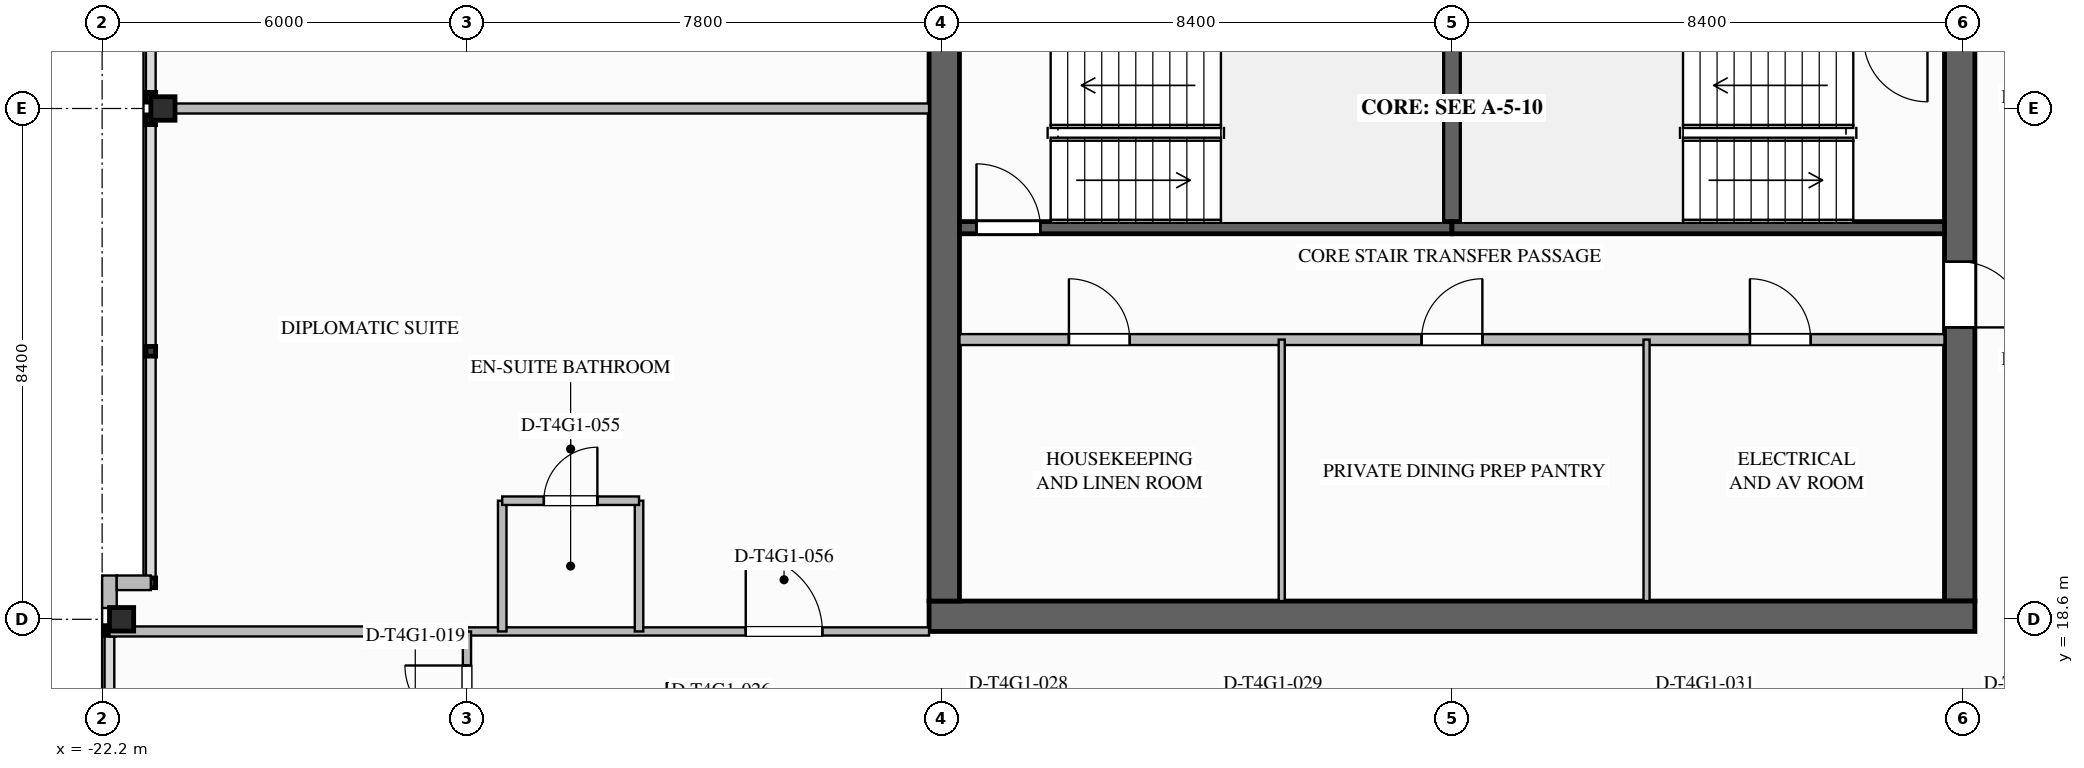
"""IFC4 building model, lengths in metres.
Left out: names, types, materials, properties, quantities, classifications, styles, units other than length and angle.
Written with IfcOpenShell. Run it as: python <this file> out.ifc"""

import sys

from ifc_helpers import new_model, si_unit, direction, frame, frame_2d, origin, origin_2d, place, context, subcontext, project, spatial, rectangle, i_section, extrude, element, fill, save


model = new_model("IFC4")
c1 = context("Model", 3, precision=1e-05, world=origin(), true_north=direction((0.0, 1.0)))
c2 = subcontext(c1, "Body", "Model", "MODEL_VIEW")
j1 = project(units=[si_unit("LENGTHUNIT", "METRE"), si_unit("PLANEANGLEUNIT", "RADIAN")], contexts=[c1])
p1 = place(None, origin())
s1 = spatial("IfcSite", under=j1, at=p1, CompositionType="ELEMENT")
p2 = place(p1, origin())
s2 = spatial("IfcBuilding", under=s1, at=p2, CompositionType="ELEMENT")
p3 = place(p2, frame((0.0, 0.0, 208.7)))
s3 = spatial("IfcBuildingStorey", under=s2, at=p3, CompositionType="ELEMENT", Elevation=208.7)
p4 = place(p3, frame((8.35, 35.1, 0.0), z_axis=(0.0, 0.0, 1.0), x_axis=(0.0, -1.0, 0.0)))
e1 = element("IfcWall", 1, at=p4, inside=s3, PredefinedType="SHEAR", context=c2, shape_type="SweptSolid", body=[
    extrude(rectangle(XDim=16.2, YDim=0.5, at=frame_2d((8.1, 0.0))), origin(), (0.0, 0.0, 1.0), 3.6),
])
p5 = place(p4, frame((3.08, 0.0, 0.0)))
e2 = element("IfcOpeningElement", 2, at=p5, cuts=e1, PredefinedType="OPENING", context=c2, shape_type="SweptSolid", body=[
    extrude(rectangle(XDim=1.12, YDim=2.1, at=frame_2d((0.56, 1.05))), frame((0.0, 0.26, 0.0), z_axis=(0.0, -1.0, 0.0), x_axis=(1.0, 0.0, 0.0)), (0.0, 0.0, 1.0), 0.52),
])
p6 = place(p4, frame((10.62, 0.0, 0.0)))
e3 = element("IfcOpeningElement", 3, at=p6, cuts=e1, PredefinedType="OPENING", context=c2, shape_type="SweptSolid", body=[
    extrude(rectangle(XDim=1.08, YDim=2.04, at=frame_2d((0.54, 1.02))), frame((0.0, 0.26, 0.0), z_axis=(0.0, -1.0, 0.0), x_axis=(1.0, 0.0, 0.0)), (0.0, 0.0, 1.0), 0.52),
])
p7 = place(p3, frame((8.6, 18.65, 0.0), z_axis=(0.0, 0.0, 1.0), x_axis=(-1.0, 0.0, 0.0)))
e4 = element("IfcWall", 4, at=p7, inside=s3, PredefinedType="SHEAR", context=c2, shape_type="SweptSolid", body=[
    extrude(rectangle(XDim=17.2, YDim=0.5, at=frame_2d((8.6, 0.0))), origin(), (0.0, 0.0, 1.0), 3.6),
])
p8 = place(p3, frame((-8.35, 18.9, 0.0), z_axis=(0.0, 0.0, 1.0), x_axis=(0.0, 1.0, 0.0)))
e5 = element("IfcWall", 5, at=p8, inside=s3, PredefinedType="SHEAR", context=c2, shape_type="SweptSolid", body=[
    extrude(rectangle(XDim=16.2, YDim=0.5, at=frame_2d((8.1, 0.0))), origin(), (0.0, 0.0, 1.0), 3.6),
])
for number, where, z_axis, x_axis in (
    (6, (-21.88, 18.6, 0.0), (0.0, 0.0, 1.0), (1.0, 0.0, 0.0)),
    (7, (-21.2, 27.0, 0.0), (0.0, 0.0, 1.0), (1.0, 0.0, 0.0)),
):
    element("IfcColumn", number, at=place(p3, frame(where, z_axis=z_axis, x_axis=x_axis)), inside=s3, PredefinedType="COLUMN", context=c2, shape_type="SweptSolid", body=[
        extrude(i_section(OverallWidth=0.397, OverallDepth=0.387, WebThickness=0.021, FlangeThickness=0.033, FilletRadius=0.025, at=origin_2d()), origin(), (0.0, 0.0, 1.0), 3.597),
    ])
p9 = place(p3, frame((-22.08, 18.785, 0.0), z_axis=(0.0, 0.0, 1.0), x_axis=(0.0, 1.0, 0.0)))
e8 = element("IfcWall", 8, at=p9, inside=s3, PredefinedType="STANDARD", context=c2, shape_type="SweptSolid", body=[
    extrude(rectangle(XDim=0.535, YDim=0.24, at=frame_2d((0.267, 0.0))), origin(), (0.0, 0.0, 1.0), 3.34),
])
p10 = place(p3, frame((-21.96, 19.2, 0.0), z_axis=(0.0, 0.0, 1.0), x_axis=(1.0, 0.0, 0.0)))
e9 = element("IfcWall", 9, at=p10, inside=s3, PredefinedType="STANDARD", context=c2, shape_type="SweptSolid", body=[
    extrude(rectangle(XDim=0.56, YDim=0.24, at=frame_2d((0.28, 0.0))), origin(), (0.0, 0.0, 1.0), 3.34),
])
p11 = place(p3, frame((0.0, 25.04, 0.0), z_axis=(0.0, 0.0, 1.0), x_axis=(0.0, 1.0, 0.0)))
e10 = element("IfcWall", 10, at=p11, inside=s3, PredefinedType="SOLIDWALL", context=c2, shape_type="SweptSolid", body=[
    extrude(rectangle(XDim=3.12, YDim=0.3, at=frame_2d((1.56, 0.0))), origin(), (0.0, 0.0, 1.0), 3.34),
])
p12 = place(p3, frame((-8.1, 25.04, 0.0), z_axis=(0.0, 0.0, 1.0), x_axis=(1.0, 0.0, 0.0)))
e11 = element("IfcWall", 11, at=p12, inside=s3, PredefinedType="SOLIDWALL", context=c2, shape_type="SweptSolid", body=[
    extrude(rectangle(XDim=8.1, YDim=0.2, at=frame_2d((4.05, 0.0))), origin(), (0.0, 0.0, 1.0), 3.34),
])
p13 = place(p12, frame((0.28, 0.0, 0.0)))
e12 = element("IfcOpeningElement", 12, at=p13, cuts=e11, PredefinedType="OPENING", context=c2, shape_type="SweptSolid", body=[
    extrude(rectangle(XDim=1.05, YDim=2.1, at=frame_2d((0.525, 1.05))), frame((0.0, 0.11, 0.0), z_axis=(0.0, -1.0, 0.0), x_axis=(1.0, 0.0, 0.0)), (0.0, 0.0, 1.0), 0.22),
])
p14 = place(p3, frame((0.0, 25.04, 0.0), z_axis=(0.0, 0.0, 1.0), x_axis=(1.0, 0.0, 0.0)))
e13 = element("IfcWall", 13, at=p14, inside=s3, PredefinedType="SOLIDWALL", context=c2, shape_type="SweptSolid", body=[
    extrude(rectangle(XDim=8.1, YDim=0.2, at=frame_2d((4.05, 0.0))), origin(), (0.0, 0.0, 1.0), 3.34),
])
p15 = place(p3, frame((-8.1, 23.2, 0.0), z_axis=(0.0, 0.0, 1.0), x_axis=(1.0, 0.0, 0.0)))
e14 = element("IfcWall", 14, at=p15, inside=s3, PredefinedType="SOLIDWALL", context=c2, shape_type="SweptSolid", body=[
    extrude(rectangle(XDim=16.2, YDim=0.18, at=frame_2d((8.1, 0.0))), origin(), (0.0, 0.0, 1.0), 3.34),
])
p16 = place(p15, frame((1.8, 0.0, 0.0)))
e15 = element("IfcOpeningElement", 15, at=p16, cuts=e14, PredefinedType="OPENING", context=c2, shape_type="SweptSolid", body=[
    extrude(rectangle(XDim=1.0, YDim=2.1, at=frame_2d((0.5, 1.05))), frame((0.0, 0.1, 0.0), z_axis=(0.0, -1.0, 0.0), x_axis=(1.0, 0.0, 0.0)), (0.0, 0.0, 1.0), 0.2),
])
p17 = place(p15, frame((7.6, 0.0, 0.0)))
e16 = element("IfcOpeningElement", 16, at=p17, cuts=e14, PredefinedType="OPENING", context=c2, shape_type="SweptSolid", body=[
    extrude(rectangle(XDim=1.0, YDim=2.1, at=frame_2d((0.5, 1.05))), frame((0.0, 0.1, 0.0), z_axis=(0.0, -1.0, 0.0), x_axis=(1.0, 0.0, 0.0)), (0.0, 0.0, 1.0), 0.2),
])
p18 = place(p15, frame((13.0, 0.0, 0.0)))
e17 = element("IfcOpeningElement", 17, at=p18, cuts=e14, PredefinedType="OPENING", context=c2, shape_type="SweptSolid", body=[
    extrude(rectangle(XDim=1.0, YDim=2.1, at=frame_2d((0.5, 1.05))), frame((0.0, 0.1, 0.0), z_axis=(0.0, -1.0, 0.0), x_axis=(1.0, 0.0, 0.0)), (0.0, 0.0, 1.0), 0.2),
])
for number, where, z_axis, x_axis in (
    (18, (-2.8, 18.9, 0.0), (0.0, 0.0, 1.0), (0.0, 1.0, 0.0)),
    (19, (3.2, 18.9, 0.0), (0.0, 0.0, 1.0), (0.0, 1.0, 0.0)),
):
    element("IfcWall", number, at=place(p3, frame(where, z_axis=z_axis, x_axis=x_axis)), inside=s3, PredefinedType="PARTITIONING", context=c2, shape_type="SweptSolid", body=[
        extrude(rectangle(XDim=4.3, YDim=0.1, at=frame_2d((2.15, 0.0))), origin(), (0.0, 0.0, 1.0), 3.34),
    ])
p19 = place(p3, frame((-16.2, 18.4, 0.0), z_axis=(0.0, 0.0, 1.0), x_axis=(1.0, 0.0, 0.0)))
e20 = element("IfcWall", 20, at=p19, inside=s3, PredefinedType="PARTITIONING", context=c2, shape_type="SweptSolid", body=[
    extrude(rectangle(XDim=7.6, YDim=0.135, at=frame_2d((3.8, 0.0))), origin(), (0.0, 0.0, 1.0), 2.718),
])
p20 = place(p19, frame((4.585, 0.0, 0.0)))
e21 = element("IfcOpeningElement", 21, at=p20, cuts=e20, PredefinedType="OPENING", context=c2, shape_type="SweptSolid", body=[
    extrude(rectangle(XDim=1.26, YDim=2.2, at=frame_2d((0.63, 1.1))), frame((0.0, 0.077, 0.0), z_axis=(0.0, -1.0, 0.0), x_axis=(1.0, 0.0, 0.0)), (0.0, 0.0, 1.0), 0.155),
])
p21 = place(p3, frame((-16.2, 16.3, 0.0), z_axis=(0.0, 0.0, 1.0), x_axis=(0.0, 1.0, 0.0)))
e22 = element("IfcWall", 22, at=p21, inside=s3, PredefinedType="PARTITIONING", context=c2, shape_type="SweptSolid", body=[
    extrude(rectangle(XDim=2.1, YDim=0.135, at=frame_2d((1.05, 0.0))), origin(), (0.0, 0.0, 1.0), 2.714),
])
p22 = place(p21, frame((0.52, 0.0, 0.0)))
e23 = element("IfcOpeningElement", 23, at=p22, cuts=e22, PredefinedType="OPENING", context=c2, shape_type="SweptSolid", body=[
    extrude(rectangle(XDim=1.02, YDim=2.15, at=frame_2d((0.51, 1.075))), frame((0.0, 0.077, 0.0), z_axis=(0.0, -1.0, 0.0), x_axis=(1.0, 0.0, 0.0)), (0.0, 0.0, 1.0), 0.155),
])
p23 = place(p3, frame((-22.08, 18.4, 0.0), z_axis=(0.0, 0.0, 1.0), x_axis=(1.0, 0.0, 0.0)))
e24 = element("IfcWall", 24, at=p23, inside=s3, PredefinedType="PARTITIONING", context=c2, shape_type="SweptSolid", body=[
    extrude(rectangle(XDim=5.88, YDim=0.165, at=frame_2d((2.94, 0.0))), origin(), (0.0, 0.0, 1.0), 2.714),
])
p24 = place(p3, frame((-21.4, 27.0, 0.0), z_axis=(0.0, 0.0, 1.0), x_axis=(1.0, 0.0, 0.0)))
e25 = element("IfcWall", 25, at=p24, inside=s3, PredefinedType="PARTITIONING", context=c2, shape_type="SweptSolid", body=[
    extrude(rectangle(XDim=12.8, YDim=0.165, at=frame_2d((6.4, 0.0))), origin(), (0.0, 0.0, 1.0), 2.714),
])
for number, where, z_axis, x_axis in (
    (26, (-15.62, 18.4, 0.0), (0.0, 0.0, 1.0), (0.0, 1.0, 0.0)),
    (27, (-13.37, 18.4, 0.0), (0.0, 0.0, 1.0), (0.0, 1.0, 0.0)),
):
    element("IfcWall", number, at=place(p3, frame(where, z_axis=z_axis, x_axis=x_axis)), inside=s3, PredefinedType="PLUMBINGWALL", context=c2, shape_type="SweptSolid", body=[
        extrude(rectangle(XDim=2.15, YDim=0.14, at=frame_2d((1.075, 0.0))), origin(), (0.0, 0.0, 1.0), 3.34),
    ])
p25 = place(p3, frame((-15.62, 20.55, 0.0), z_axis=(0.0, 0.0, 1.0), x_axis=(1.0, 0.0, 0.0)))
e28 = element("IfcWall", 28, at=p25, inside=s3, PredefinedType="PLUMBINGWALL", context=c2, shape_type="SweptSolid", body=[
    extrude(rectangle(XDim=2.25, YDim=0.14, at=frame_2d((1.125, 0.0))), origin(), (0.0, 0.0, 1.0), 3.34),
])
p26 = place(p25, frame((0.685, 0.0, 0.0)))
e29 = element("IfcOpeningElement", 29, at=p26, cuts=e28, PredefinedType="OPENING", context=c2, shape_type="SweptSolid", body=[
    extrude(rectangle(XDim=0.88, YDim=2.1, at=frame_2d((0.44, 1.05))), frame((0.0, 0.08, 0.0), z_axis=(0.0, -1.0, 0.0), x_axis=(1.0, 0.0, 0.0)), (0.0, 0.0, 1.0), 0.16),
])
p27 = place(p13, origin())
e30 = element("IfcDoor", 30, at=p27, inside=s3, OperationType="SINGLE_SWING_LEFT", PredefinedType="DOOR", context=c2, shape_type="SweptSolid", body=[
    extrude(rectangle(XDim=1.05, YDim=2.1, at=frame_2d((0.525, 1.05))), frame((0.0, 0.025, 0.0), z_axis=(0.0, -1.0, 0.0), x_axis=(1.0, 0.0, 0.0)), (0.0, 0.0, 1.0), 0.05),
])
fill(e12, e30)
p28 = place(p6, origin())
e31 = element("IfcDoor", 31, at=p28, inside=s3, OperationType="SINGLE_SWING_RIGHT", PredefinedType="DOOR", context=c2, shape_type="SweptSolid", body=[
    extrude(rectangle(XDim=1.08, YDim=2.04, at=frame_2d((0.54, 1.02))), frame((0.0, 0.025, 0.0), z_axis=(0.0, -1.0, 0.0), x_axis=(1.0, 0.0, 0.0)), (0.0, 0.0, 1.0), 0.05),
])
fill(e3, e31)
p29 = place(p16, origin())
e32 = element("IfcDoor", 32, at=p29, inside=s3, OperationType="SINGLE_SWING_LEFT", PredefinedType="DOOR", context=c2, shape_type="SweptSolid", body=[
    extrude(rectangle(XDim=1.0, YDim=2.1, at=frame_2d((0.5, 1.05))), frame((0.0, 0.025, 0.0), z_axis=(0.0, -1.0, 0.0), x_axis=(1.0, 0.0, 0.0)), (0.0, 0.0, 1.0), 0.05),
])
fill(e15, e32)
p30 = place(p17, origin())
e33 = element("IfcDoor", 33, at=p30, inside=s3, OperationType="SINGLE_SWING_RIGHT", PredefinedType="DOOR", context=c2, shape_type="SweptSolid", body=[
    extrude(rectangle(XDim=1.0, YDim=2.1, at=frame_2d((0.5, 1.05))), frame((0.0, 0.025, 0.0), z_axis=(0.0, -1.0, 0.0), x_axis=(1.0, 0.0, 0.0)), (0.0, 0.0, 1.0), 0.05),
])
fill(e16, e33)
p31 = place(p18, origin())
e34 = element("IfcDoor", 34, at=p31, inside=s3, OperationType="SINGLE_SWING_LEFT", PredefinedType="DOOR", context=c2, shape_type="SweptSolid", body=[
    extrude(rectangle(XDim=1.0, YDim=2.1, at=frame_2d((0.5, 1.05))), frame((0.0, 0.025, 0.0), z_axis=(0.0, -1.0, 0.0), x_axis=(1.0, 0.0, 0.0)), (0.0, 0.0, 1.0), 0.05),
])
fill(e17, e34)
p32 = place(p22, origin())
e35 = element("IfcDoor", 35, at=p32, inside=s3, OperationType="SINGLE_SWING_RIGHT", PredefinedType="DOOR", context=c2, shape_type="SweptSolid", body=[
    extrude(rectangle(XDim=1.02, YDim=2.15, at=frame_2d((0.51, 1.075))), frame((0.0, 0.025, 0.0), z_axis=(0.0, -1.0, 0.0), x_axis=(1.0, 0.0, 0.0)), (0.0, 0.0, 1.0), 0.05),
])
fill(e23, e35)
p33 = place(p26, origin())
e36 = element("IfcDoor", 36, at=p33, inside=s3, OperationType="SINGLE_SWING_RIGHT", PredefinedType="DOOR", context=c2, shape_type="SweptSolid", body=[
    extrude(rectangle(XDim=0.88, YDim=2.1, at=frame_2d((0.44, 1.05))), frame((0.0, 0.025, 0.0), z_axis=(0.0, -1.0, 0.0), x_axis=(1.0, 0.0, 0.0)), (0.0, 0.0, 1.0), 0.05),
])
fill(e29, e36)
p34 = place(p20, origin())
e37 = element("IfcDoor", 37, at=p34, inside=s3, OperationType="SINGLE_SWING_LEFT", PredefinedType="DOOR", context=c2, shape_type="SweptSolid", body=[
    extrude(rectangle(XDim=1.26, YDim=2.2, at=frame_2d((0.63, 1.1))), frame((0.0, 0.025, 0.0), z_axis=(0.0, -1.0, 0.0), x_axis=(1.0, 0.0, 0.0)), (0.0, 0.0, 1.0), 0.05),
])
fill(e21, e37)
save(model, sys.argv[1])
